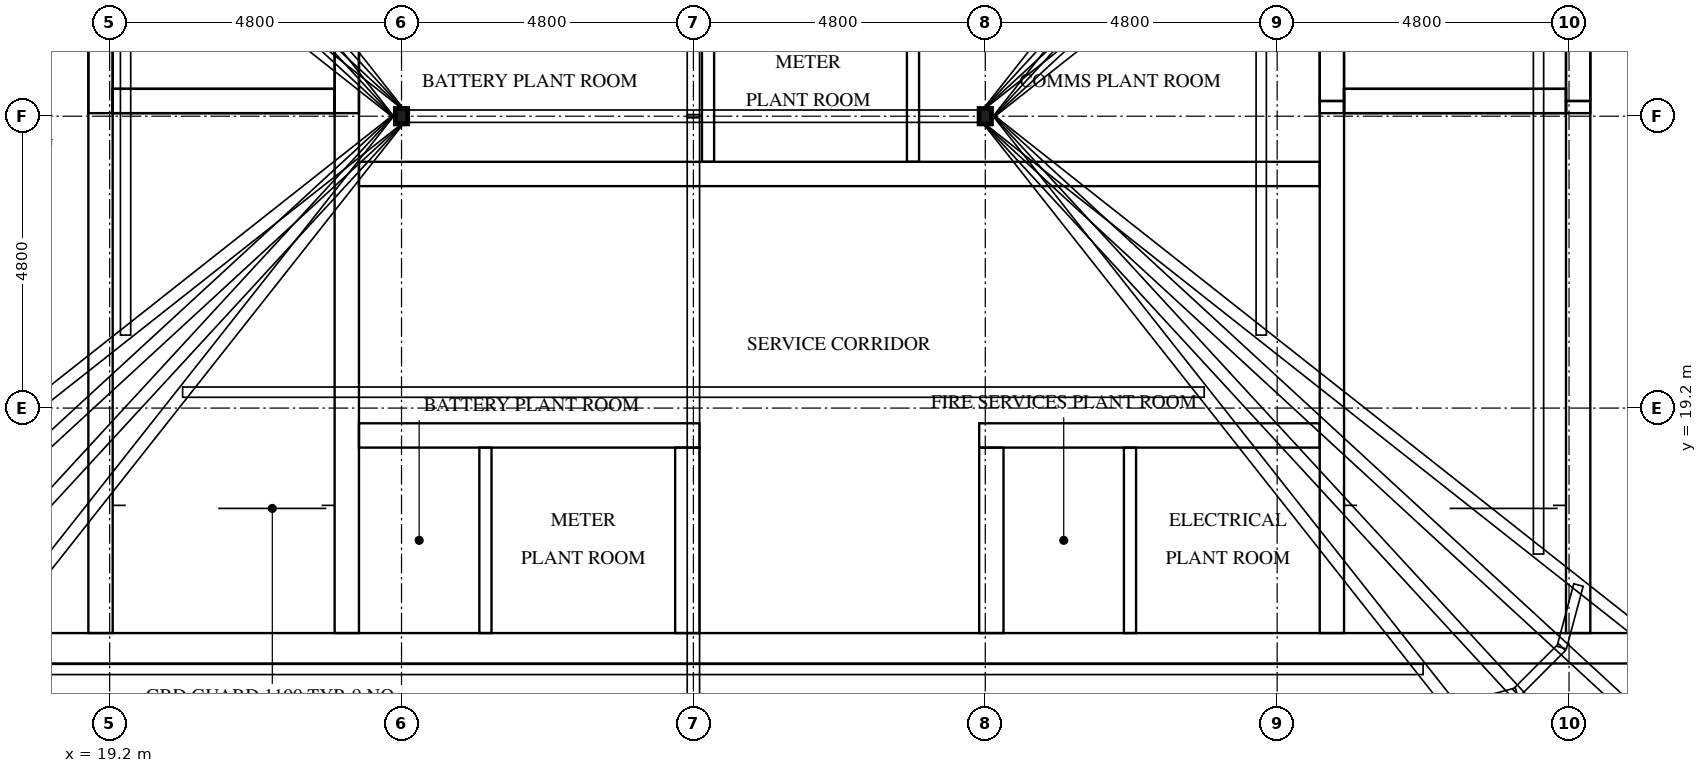
"""IFC4 building model, lengths in metres.
Left out: names, types, materials, properties, quantities, classifications, styles, units other than length and angle.
Written with IfcOpenShell. Run it as: python <this file> out.ifc"""

import sys

from ifc_helpers import new_model, si_unit, direction, frame, frame_2d, origin, origin_2d, place, context, subcontext, project, spatial, rectangle, hollow_rectangle, extrude, element, fill, save


model = new_model("IFC4")
c1 = context("Model", 3, precision=1e-05, world=origin(), true_north=direction((0.0, 1.0)))
c2 = subcontext(c1, "Body", "Model", "MODEL_VIEW")
j1 = project(units=[si_unit("LENGTHUNIT", "METRE"), si_unit("PLANEANGLEUNIT", "RADIAN")], contexts=[c1])
p1 = place(None, origin())
s1 = spatial("IfcSite", under=j1, at=p1, CompositionType="ELEMENT")
p2 = place(p1, origin())
s2 = spatial("IfcBuilding", under=s1, at=p2, CompositionType="ELEMENT")
p3 = place(p2, frame((0.0, 0.0, 317.3)))
s3 = spatial("IfcBuildingStorey", under=s2, at=p3, CompositionType="ELEMENT", Elevation=317.3)
p4 = place(p3, frame((15.0, 15.25, 0.0), z_axis=(0.0, 0.0, 1.0), x_axis=(1.0, 0.0, 0.0)))
e1 = element("IfcWall", 1, at=p4, inside=s3, PredefinedType="SHEAR", context=c2, shape_type="SweptSolid", body=[
    extrude(rectangle(XDim=32.4, YDim=0.5, at=frame_2d((16.2, 0.0))), origin(), (0.0, 0.0, 1.0), 3.0),
])
p5 = place(p4, frame((15.3, 0.0, 0.0)))
e2 = element("IfcOpeningElement", 2, at=p5, cuts=e1, PredefinedType="OPENING", context=c2, shape_type="SweptSolid", body=[
    extrude(rectangle(XDim=1.8, YDim=2.1, at=frame_2d((0.9, 1.05))), frame((0.0, 0.26, 0.0), z_axis=(0.0, -1.0, 0.0), x_axis=(1.0, 0.0, 0.0)), (0.0, 0.0, 1.0), 0.52),
])
p6 = place(p3, frame((19.05, 15.5, 0.0), z_axis=(0.0, 0.0, 1.0), x_axis=(0.0, 1.0, 0.0)))
e3 = element("IfcWall", 3, at=p6, inside=s3, PredefinedType="SHEAR", context=c2, shape_type="SweptSolid", body=[
    extrude(rectangle(XDim=15.55, YDim=0.4, at=frame_2d((7.775, 0.0))), origin(), (0.0, 0.0, 1.0), 3.0),
])
p7 = place(p6, frame((9.95, 0.0, 0.0)))
e4 = element("IfcOpeningElement", 4, at=p7, cuts=e3, PredefinedType="OPENING", context=c2, shape_type="SweptSolid", body=[
    extrude(rectangle(XDim=1.1, YDim=2.1, at=frame_2d((0.55, 1.05))), frame((0.0, 0.21, 0.0), z_axis=(0.0, -1.0, 0.0), x_axis=(1.0, 0.0, 0.0)), (0.0, 0.0, 1.0), 0.42),
])
p8 = place(p6, frame((13.45, 0.0, 0.0)))
e5 = element("IfcOpeningElement", 5, at=p8, cuts=e3, PredefinedType="OPENING", context=c2, shape_type="SweptSolid", body=[
    extrude(rectangle(XDim=1.1, YDim=2.1, at=frame_2d((0.55, 1.05))), frame((0.0, 0.21, 0.0), z_axis=(0.0, -1.0, 0.0), x_axis=(1.0, 0.0, 0.0)), (0.0, 0.0, 1.0), 0.42),
])
p9 = place(p6, frame((0.7, 0.0, 0.0)))
e6 = element("IfcOpeningElement", 6, at=p9, cuts=e3, PredefinedType="OPENING", context=c2, shape_type="SweptSolid", body=[
    extrude(rectangle(XDim=1.2, YDim=2.1, at=frame_2d((0.6, 1.05))), frame((0.0, 0.21, 0.0), z_axis=(0.0, -1.0, 0.0), x_axis=(1.0, 0.0, 0.0)), (0.0, 0.0, 1.0), 0.42),
])
p10 = place(p3, frame((23.1, 15.5, 0.0), z_axis=(0.0, 0.0, 1.0), x_axis=(0.0, 1.0, 0.0)))
e7 = element("IfcWall", 7, at=p10, inside=s3, PredefinedType="SHEAR", context=c2, shape_type="SweptSolid", body=[
    extrude(rectangle(XDim=21.8, YDim=0.4, at=frame_2d((10.9, 0.0))), origin(), (0.0, 0.0, 1.0), 3.0),
])
p11 = place(p3, frame((39.3, 15.5, 0.0), z_axis=(0.0, 0.0, 1.0), x_axis=(0.0, 1.0, 0.0)))
e8 = element("IfcWall", 8, at=p11, inside=s3, PredefinedType="SHEAR", context=c2, shape_type="SweptSolid", body=[
    extrude(rectangle(XDim=8.75, YDim=0.4, at=frame_2d((4.375, 0.0))), origin(), (0.0, 0.0, 1.0), 3.0),
])
p12 = place(p3, frame((39.3, 24.25, 0.0), z_axis=(0.0, 0.0, 1.0), x_axis=(0.0, 1.0, 0.0)))
e9 = element("IfcWall", 9, at=p12, inside=s3, PredefinedType="SHEAR", context=c2, shape_type="SweptSolid", body=[
    extrude(rectangle(XDim=3.5, YDim=0.4, at=frame_2d((1.75, 0.0))), origin(), (0.0, 0.0, 1.0), 3.0),
])
p13 = place(p3, frame((43.35, 15.5, 0.0), z_axis=(0.0, 0.0, 1.0), x_axis=(0.0, 1.0, 0.0)))
e10 = element("IfcWall", 10, at=p13, inside=s3, PredefinedType="SHEAR", context=c2, shape_type="SweptSolid", body=[
    extrude(rectangle(XDim=8.75, YDim=0.4, at=frame_2d((4.375, 0.0))), origin(), (0.0, 0.0, 1.0), 3.0),
])
p14 = place(p13, frame((0.7, 0.0, 0.0)))
e11 = element("IfcOpeningElement", 11, at=p14, cuts=e10, PredefinedType="OPENING", context=c2, shape_type="SweptSolid", body=[
    extrude(rectangle(XDim=1.2, YDim=2.1, at=frame_2d((0.6, 1.05))), frame((0.0, 0.21, 0.0), z_axis=(0.0, -1.0, 0.0), x_axis=(1.0, 0.0, 0.0)), (0.0, 0.0, 1.0), 0.42),
])
p15 = place(p3, frame((43.35, 24.25, 0.0), z_axis=(0.0, 0.0, 1.0), x_axis=(0.0, 1.0, 0.0)))
e12 = element("IfcWall", 12, at=p15, inside=s3, PredefinedType="SHEAR", context=c2, shape_type="SweptSolid", body=[
    extrude(rectangle(XDim=3.5, YDim=0.4, at=frame_2d((1.75, 0.0))), origin(), (0.0, 0.0, 1.0), 3.0),
])
p16 = place(p15, frame((1.2, 0.0, 0.0)))
e13 = element("IfcOpeningElement", 13, at=p16, cuts=e12, PredefinedType="OPENING", context=c2, shape_type="SweptSolid", body=[
    extrude(rectangle(XDim=1.1, YDim=2.1, at=frame_2d((0.55, 1.05))), frame((0.0, 0.21, 0.0), z_axis=(0.0, -1.0, 0.0), x_axis=(1.0, 0.0, 0.0)), (0.0, 0.0, 1.0), 0.42),
])
for number, where, z_axis, x_axis in (
    (14, (19.25, 24.25, 0.0), (0.0, 0.0, 1.0), (1.0, 0.0, 0.0)),
    (15, (39.5, 24.25, 0.0), (0.0, 0.0, 1.0), (1.0, 0.0, 0.0)),
):
    element("IfcWall", number, at=place(p3, frame(where, z_axis=z_axis, x_axis=x_axis)), inside=s3, PredefinedType="SHEAR", context=c2, shape_type="SweptSolid", body=[
        extrude(rectangle(XDim=3.65, YDim=0.4, at=frame_2d((1.825, 0.0))), origin(), (0.0, 0.0, 1.0), 3.0),
    ])
p17 = place(p3, frame((23.3, 18.75, 0.0), z_axis=(0.0, 0.0, 1.0), x_axis=(1.0, 0.0, 0.0)))
e16 = element("IfcWall", 16, at=p17, inside=s3, PredefinedType="SHEAR", context=c2, shape_type="SweptSolid", body=[
    extrude(rectangle(XDim=5.6, YDim=0.4, at=frame_2d((2.8, 0.0))), origin(), (0.0, 0.0, 1.0), 3.0),
])
p18 = place(p17, frame((0.49, 0.0, 0.0)))
e17 = element("IfcOpeningElement", 17, at=p18, cuts=e16, PredefinedType="OPENING", context=c2, shape_type="SweptSolid", body=[
    extrude(rectangle(XDim=1.0, YDim=2.1, at=frame_2d((0.5, 1.05))), frame((0.0, 0.21, 0.0), z_axis=(0.0, -1.0, 0.0), x_axis=(1.0, 0.0, 0.0)), (0.0, 0.0, 1.0), 0.42),
])
p19 = place(p17, frame((3.19, 0.0, 0.0)))
e18 = element("IfcOpeningElement", 18, at=p19, cuts=e16, PredefinedType="OPENING", context=c2, shape_type="SweptSolid", body=[
    extrude(rectangle(XDim=1.0, YDim=2.1, at=frame_2d((0.5, 1.05))), frame((0.0, 0.21, 0.0), z_axis=(0.0, -1.0, 0.0), x_axis=(1.0, 0.0, 0.0)), (0.0, 0.0, 1.0), 0.42),
])
p20 = place(p3, frame((33.5, 18.75, 0.0), z_axis=(0.0, 0.0, 1.0), x_axis=(1.0, 0.0, 0.0)))
e19 = element("IfcWall", 19, at=p20, inside=s3, PredefinedType="SHEAR", context=c2, shape_type="SweptSolid", body=[
    extrude(rectangle(XDim=5.6, YDim=0.4, at=frame_2d((2.8, 0.0))), origin(), (0.0, 0.0, 1.0), 3.0),
])
p21 = place(p20, frame((0.89, 0.0, 0.0)))
e20 = element("IfcOpeningElement", 20, at=p21, cuts=e19, PredefinedType="OPENING", context=c2, shape_type="SweptSolid", body=[
    extrude(rectangle(XDim=1.0, YDim=2.1, at=frame_2d((0.5, 1.05))), frame((0.0, 0.21, 0.0), z_axis=(0.0, -1.0, 0.0), x_axis=(1.0, 0.0, 0.0)), (0.0, 0.0, 1.0), 0.42),
])
p22 = place(p20, frame((3.59, 0.0, 0.0)))
e21 = element("IfcOpeningElement", 21, at=p22, cuts=e19, PredefinedType="OPENING", context=c2, shape_type="SweptSolid", body=[
    extrude(rectangle(XDim=1.0, YDim=2.1, at=frame_2d((0.5, 1.05))), frame((0.0, 0.21, 0.0), z_axis=(0.0, -1.0, 0.0), x_axis=(1.0, 0.0, 0.0)), (0.0, 0.0, 1.0), 0.42),
])
p23 = place(p3, frame((23.3, 23.05, 0.0), z_axis=(0.0, 0.0, 1.0), x_axis=(1.0, 0.0, 0.0)))
e22 = element("IfcWall", 22, at=p23, inside=s3, PredefinedType="SHEAR", context=c2, shape_type="SweptSolid", body=[
    extrude(rectangle(XDim=15.8, YDim=0.4, at=frame_2d((7.9, 0.0))), origin(), (0.0, 0.0, 1.0), 3.0),
])
p24 = place(p23, frame((2.32, 0.0, 0.0)))
e23 = element("IfcOpeningElement", 23, at=p24, cuts=e22, PredefinedType="OPENING", context=c2, shape_type="SweptSolid", body=[
    extrude(rectangle(XDim=1.0, YDim=2.1, at=frame_2d((0.5, 1.05))), frame((0.0, 0.21, 0.0), z_axis=(0.0, -1.0, 0.0), x_axis=(1.0, 0.0, 0.0)), (0.0, 0.0, 1.0), 0.42),
])
p25 = place(p23, frame((6.926, 0.0, 0.0)))
e24 = element("IfcOpeningElement", 24, at=p25, cuts=e22, PredefinedType="OPENING", context=c2, shape_type="SweptSolid", body=[
    extrude(rectangle(XDim=1.0, YDim=2.1, at=frame_2d((0.5, 1.05))), frame((0.0, 0.21, 0.0), z_axis=(0.0, -1.0, 0.0), x_axis=(1.0, 0.0, 0.0)), (0.0, 0.0, 1.0), 0.42),
])
p26 = place(p23, frame((12.006, 0.0, 0.0)))
e25 = element("IfcOpeningElement", 25, at=p26, cuts=e22, PredefinedType="OPENING", context=c2, shape_type="SweptSolid", body=[
    extrude(rectangle(XDim=1.0, YDim=2.1, at=frame_2d((0.5, 1.05))), frame((0.0, 0.21, 0.0), z_axis=(0.0, -1.0, 0.0), x_axis=(1.0, 0.0, 0.0)), (0.0, 0.0, 1.0), 0.42),
])
for number, where, z_axis, x_axis in (
    (26, (28.7, 15.5, 0.0), (0.0, 0.0, 1.0), (0.0, 1.0, 0.0)),
    (27, (33.7, 15.5, 0.0), (0.0, 0.0, 1.0), (0.0, 1.0, 0.0)),
):
    element("IfcWall", number, at=place(p3, frame(where, z_axis=z_axis, x_axis=x_axis)), inside=s3, PredefinedType="SHEAR", context=c2, shape_type="SweptSolid", body=[
        extrude(rectangle(XDim=3.05, YDim=0.4, at=frame_2d((1.525, 0.0))), origin(), (0.0, 0.0, 1.0), 3.0),
    ])
for number, where, z_axis, x_axis in (
    (28, (19.05, 24.05, 3.0), (0.0, 0.0, 1.0), (0.0, 1.0, 0.0)),
    (29, (23.1, 24.05, 3.0), (0.0, 0.0, 1.0), (0.0, 1.0, 0.0)),
):
    element("IfcWall", number, at=place(p3, frame(where, z_axis=z_axis, x_axis=x_axis)), inside=s3, PredefinedType="SHEAR", context=c2, shape_type="SweptSolid", body=[
        extrude(rectangle(XDim=7.4, YDim=0.4, at=frame_2d((3.7, 0.0))), origin(), (0.0, 0.0, 1.0), 1.5),
    ])
p27 = place(p3, frame((19.25, 24.25, 3.0), z_axis=(0.0, 0.0, 1.0), x_axis=(1.0, 0.0, 0.0)))
e30 = element("IfcWall", 30, at=p27, inside=s3, PredefinedType="SHEAR", context=c2, shape_type="SweptSolid", body=[
    extrude(rectangle(XDim=3.65, YDim=0.4, at=frame_2d((1.825, 0.0))), origin(), (0.0, 0.0, 1.0), 1.5),
])
for number, where, z_axis, x_axis in (
    (31, (39.3, 24.05, 3.0), (0.0, 0.0, 1.0), (0.0, 1.0, 0.0)),
    (32, (43.35, 24.05, 3.0), (0.0, 0.0, 1.0), (0.0, 1.0, 0.0)),
):
    element("IfcWall", number, at=place(p3, frame(where, z_axis=z_axis, x_axis=x_axis)), inside=s3, PredefinedType="SHEAR", context=c2, shape_type="SweptSolid", body=[
        extrude(rectangle(XDim=3.9, YDim=0.4, at=frame_2d((1.95, 0.0))), origin(), (0.0, 0.0, 1.0), 1.5),
    ])
p28 = place(p3, frame((39.5, 24.25, 3.0), z_axis=(0.0, 0.0, 1.0), x_axis=(1.0, 0.0, 0.0)))
e33 = element("IfcWall", 33, at=p28, inside=s3, PredefinedType="SHEAR", context=c2, shape_type="SweptSolid", body=[
    extrude(rectangle(XDim=3.65, YDim=0.4, at=frame_2d((1.825, 0.0))), origin(), (0.0, 0.0, 1.0), 1.5),
])
for number, where, z_axis, x_axis in (
    (34, (24.0, 24.0, 0.0), (0.0, 0.0, 1.0), (1.0, 0.0, 0.0)),
    (35, (33.6, 24.0, 0.0), (0.0, 0.0, 1.0), (1.0, 0.0, 0.0)),
):
    element("IfcColumn", number, at=place(p3, frame(where, z_axis=z_axis, x_axis=x_axis)), inside=s3, PredefinedType="COLUMN", context=c2, shape_type="SweptSolid", body=[
        extrude(hollow_rectangle(XDim=0.203, YDim=0.254, WallThickness=0.01, InnerFilletRadius=0.004, OuterFilletRadius=0.013, at=origin_2d()), origin(), (0.0, 0.0, 1.0), 6.995),
    ])
for number, where, z_axis, x_axis in (
    (36, (29.041, 23.25, 0.0), (0.0, 0.0, 1.0), (0.0, 1.0, 0.0)),
    (37, (32.411, 23.25, 0.0), (0.0, 0.0, 1.0), (0.0, 1.0, 0.0)),
):
    element("IfcWall", number, at=place(p3, frame(where, z_axis=z_axis, x_axis=x_axis)), inside=s3, PredefinedType="PARTITIONING", context=c2, shape_type="SweptSolid", body=[
        extrude(rectangle(XDim=2.7, YDim=0.2, at=frame_2d((1.35, 0.0))), origin(), (0.0, 0.0, 1.0), 3.0),
    ])
for number, where, z_axis, x_axis in (
    (38, (25.38, 15.5, 0.0), (0.0, 0.0, 1.0), (0.0, 1.0, 0.0)),
    (39, (35.98, 15.5, 0.0), (0.0, 0.0, 1.0), (0.0, 1.0, 0.0)),
):
    element("IfcWall", number, at=place(p3, frame(where, z_axis=z_axis, x_axis=x_axis)), inside=s3, PredefinedType="PARTITIONING", context=c2, shape_type="SweptSolid", body=[
        extrude(rectangle(XDim=3.05, YDim=0.2, at=frame_2d((1.525, 0.0))), origin(), (0.0, 0.0, 1.0), 3.0),
    ])
p29 = place(p9, frame((1.2, 0.0, 0.0), z_axis=(0.0, 0.0, 1.0), x_axis=(-1.0, 0.0, 0.0)))
e40 = element("IfcDoor", 40, at=p29, inside=s3, OperationType="SINGLE_SWING_RIGHT", PredefinedType="DOOR", context=c2, shape_type="SweptSolid", body=[
    extrude(rectangle(XDim=1.2, YDim=2.1, at=frame_2d((0.6, 1.05))), frame((0.0, 0.025, 0.0), z_axis=(0.0, -1.0, 0.0), x_axis=(1.0, 0.0, 0.0)), (0.0, 0.0, 1.0), 0.05),
])
fill(e6, e40)
p30 = place(p14, origin())
e41 = element("IfcDoor", 41, at=p30, inside=s3, OperationType="SINGLE_SWING_LEFT", PredefinedType="DOOR", context=c2, shape_type="SweptSolid", body=[
    extrude(rectangle(XDim=1.2, YDim=2.1, at=frame_2d((0.6, 1.05))), frame((0.0, 0.025, 0.0), z_axis=(0.0, -1.0, 0.0), x_axis=(1.0, 0.0, 0.0)), (0.0, 0.0, 1.0), 0.05),
])
fill(e11, e41)
p31 = place(p5, frame((1.8, 0.0, 0.0), z_axis=(0.0, 0.0, 1.0), x_axis=(-1.0, 0.0, 0.0)))
e42 = element("IfcDoor", 42, at=p31, inside=s3, OperationType="DOUBLE_DOOR_SINGLE_SWING", PredefinedType="DOOR", context=c2, shape_type="SweptSolid", body=[
    extrude(rectangle(XDim=1.8, YDim=2.1, at=frame_2d((0.9, 1.05))), frame((0.0, 0.025, 0.0), z_axis=(0.0, -1.0, 0.0), x_axis=(1.0, 0.0, 0.0)), (0.0, 0.0, 1.0), 0.05),
])
fill(e2, e42)
p32 = place(p24, frame((1.0, 0.0, 0.0), z_axis=(0.0, 0.0, 1.0), x_axis=(-1.0, 0.0, 0.0)))
e43 = element("IfcDoor", 43, at=p32, inside=s3, OperationType="SINGLE_SWING_LEFT", PredefinedType="DOOR", context=c2, shape_type="SweptSolid", body=[
    extrude(rectangle(XDim=1.0, YDim=2.1, at=frame_2d((0.5, 1.05))), frame((0.0, 0.025, 0.0), z_axis=(0.0, -1.0, 0.0), x_axis=(1.0, 0.0, 0.0)), (0.0, 0.0, 1.0), 0.05),
])
fill(e23, e43)
p33 = place(p25, frame((1.0, 0.0, 0.0), z_axis=(0.0, 0.0, 1.0), x_axis=(-1.0, 0.0, 0.0)))
e44 = element("IfcDoor", 44, at=p33, inside=s3, OperationType="SINGLE_SWING_RIGHT", PredefinedType="DOOR", context=c2, shape_type="SweptSolid", body=[
    extrude(rectangle(XDim=1.0, YDim=2.1, at=frame_2d((0.5, 1.05))), frame((0.0, 0.025, 0.0), z_axis=(0.0, -1.0, 0.0), x_axis=(1.0, 0.0, 0.0)), (0.0, 0.0, 1.0), 0.05),
])
fill(e24, e44)
p34 = place(p26, frame((1.0, 0.0, 0.0), z_axis=(0.0, 0.0, 1.0), x_axis=(-1.0, 0.0, 0.0)))
e45 = element("IfcDoor", 45, at=p34, inside=s3, OperationType="SINGLE_SWING_LEFT", PredefinedType="DOOR", context=c2, shape_type="SweptSolid", body=[
    extrude(rectangle(XDim=1.0, YDim=2.1, at=frame_2d((0.5, 1.05))), frame((0.0, 0.025, 0.0), z_axis=(0.0, -1.0, 0.0), x_axis=(1.0, 0.0, 0.0)), (0.0, 0.0, 1.0), 0.05),
])
fill(e25, e45)
p35 = place(p18, origin())
e46 = element("IfcDoor", 46, at=p35, inside=s3, OperationType="SINGLE_SWING_LEFT", PredefinedType="DOOR", context=c2, shape_type="SweptSolid", body=[
    extrude(rectangle(XDim=1.0, YDim=2.1, at=frame_2d((0.5, 1.05))), frame((0.0, 0.025, 0.0), z_axis=(0.0, -1.0, 0.0), x_axis=(1.0, 0.0, 0.0)), (0.0, 0.0, 1.0), 0.05),
])
fill(e17, e46)
p36 = place(p19, origin())
e47 = element("IfcDoor", 47, at=p36, inside=s3, OperationType="SINGLE_SWING_RIGHT", PredefinedType="DOOR", context=c2, shape_type="SweptSolid", body=[
    extrude(rectangle(XDim=1.0, YDim=2.1, at=frame_2d((0.5, 1.05))), frame((0.0, 0.025, 0.0), z_axis=(0.0, -1.0, 0.0), x_axis=(1.0, 0.0, 0.0)), (0.0, 0.0, 1.0), 0.05),
])
fill(e18, e47)
p37 = place(p21, origin())
e48 = element("IfcDoor", 48, at=p37, inside=s3, OperationType="SINGLE_SWING_LEFT", PredefinedType="DOOR", context=c2, shape_type="SweptSolid", body=[
    extrude(rectangle(XDim=1.0, YDim=2.1, at=frame_2d((0.5, 1.05))), frame((0.0, 0.025, 0.0), z_axis=(0.0, -1.0, 0.0), x_axis=(1.0, 0.0, 0.0)), (0.0, 0.0, 1.0), 0.05),
])
fill(e20, e48)
p38 = place(p22, origin())
e49 = element("IfcDoor", 49, at=p38, inside=s3, OperationType="SINGLE_SWING_RIGHT", PredefinedType="DOOR", context=c2, shape_type="SweptSolid", body=[
    extrude(rectangle(XDim=1.0, YDim=2.1, at=frame_2d((0.5, 1.05))), frame((0.0, 0.025, 0.0), z_axis=(0.0, -1.0, 0.0), x_axis=(1.0, 0.0, 0.0)), (0.0, 0.0, 1.0), 0.05),
])
fill(e21, e49)
save(model, sys.argv[1])
